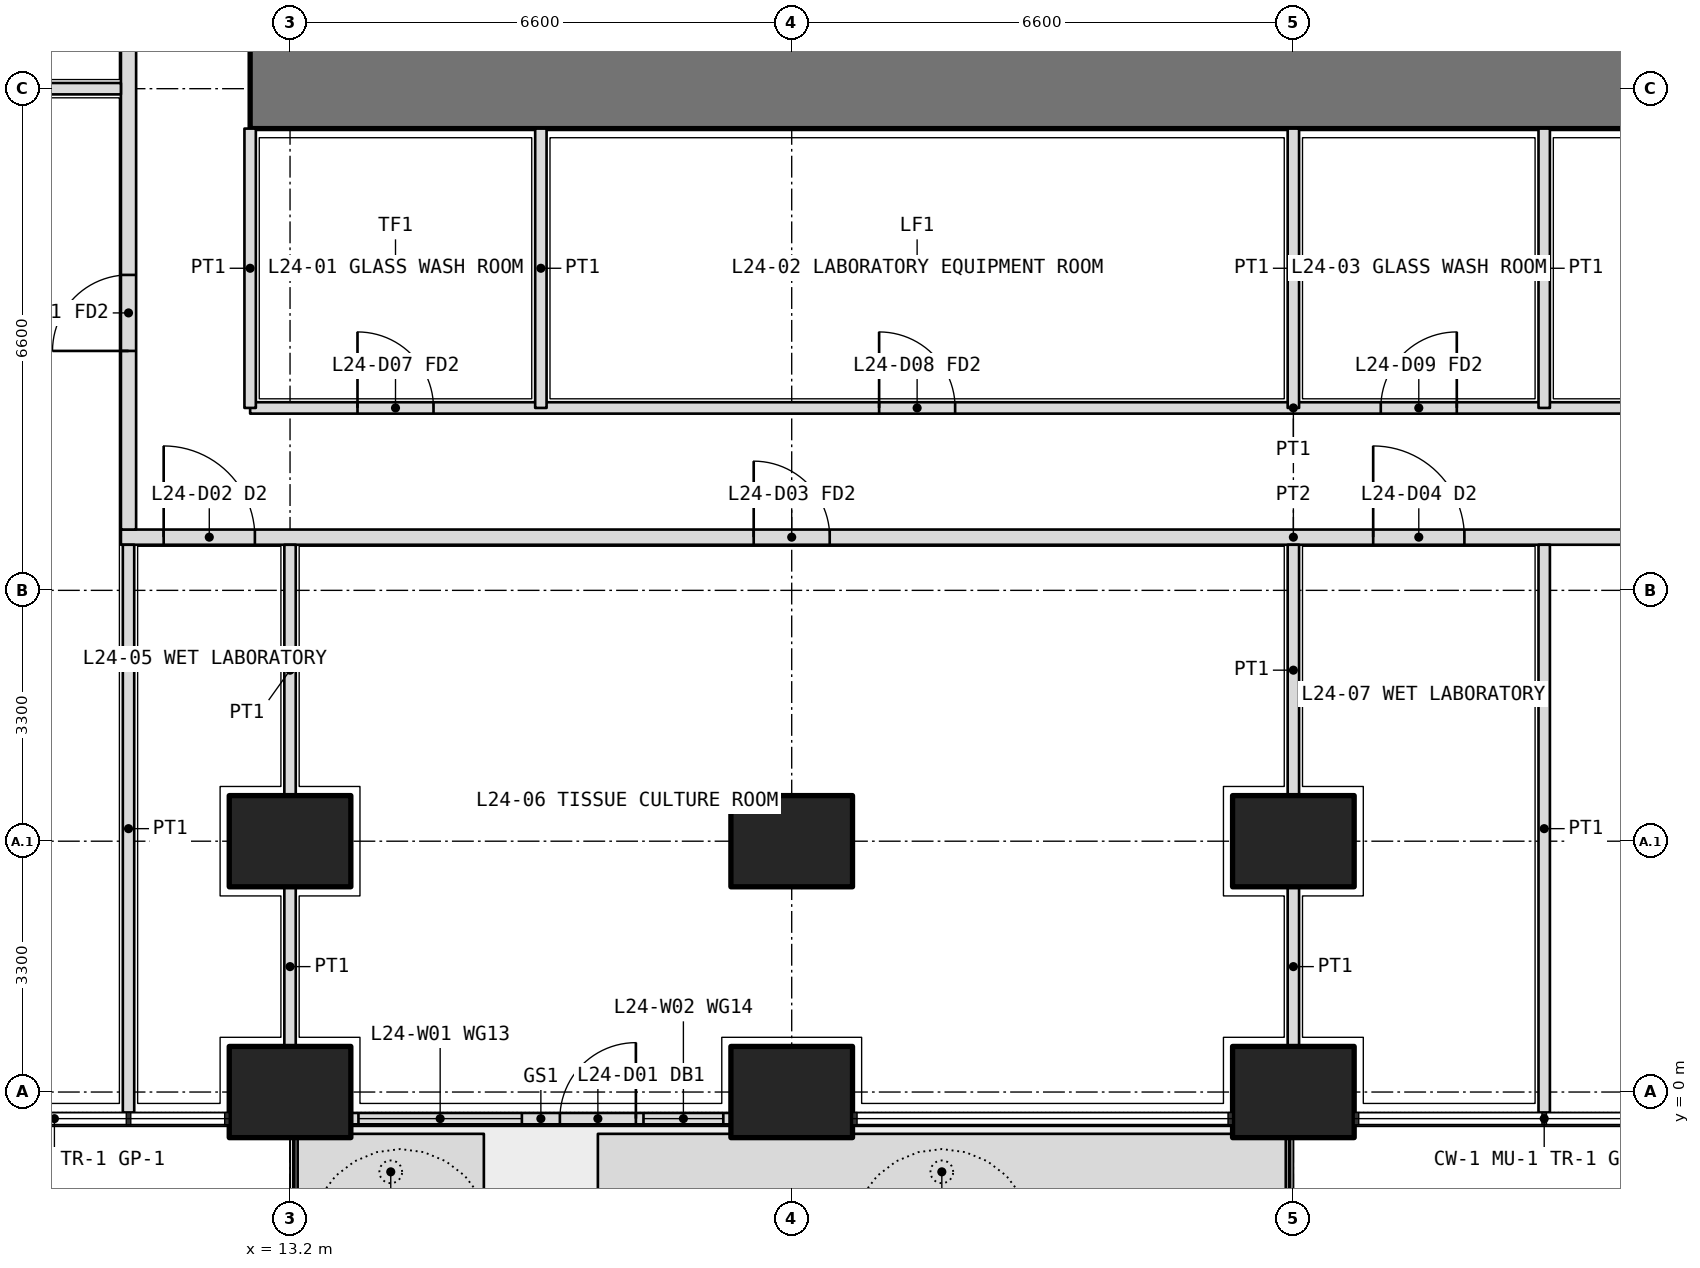
"""IFC4 building model, lengths in metres.
Left out: names, types, materials, properties, quantities, classifications, styles, units other than length and angle.
Written with IfcOpenShell. Run it as: python <this file> out.ifc"""

import sys

from ifc_helpers import new_model, si_unit, direction, frame, frame_2d, origin, origin_2d, place, context, subcontext, project, spatial, polyline, rectangle, outline, extrude, element, fill, save


model = new_model("IFC4")
c1 = context("Model", 3, precision=1e-05, world=origin(), true_north=direction((0.0, 1.0)))
c2 = subcontext(c1, "Body", "Model", "MODEL_VIEW")
j1 = project(units=[si_unit("LENGTHUNIT", "METRE"), si_unit("PLANEANGLEUNIT", "RADIAN")], contexts=[c1])
p1 = place(None, origin())
s1 = spatial("IfcSite", under=j1, at=p1, CompositionType="ELEMENT")
p2 = place(p1, origin())
s2 = spatial("IfcBuilding", under=s1, at=p2, CompositionType="ELEMENT")
p3 = place(p2, frame((0.0, 0.0, 107.4)))
s3 = spatial("IfcBuildingStorey", under=s2, at=p3, CompositionType="ELEMENT", Elevation=107.4)
for number, where, z_axis, x_axis in (
    (1, (13.2, 0.0, 0.0), (0.0, 0.0, 1.0), (1.0, 0.0, 0.0)),
    (2, (19.8, 0.0, 0.0), (0.0, 0.0, 1.0), (1.0, 0.0, 0.0)),
    (3, (26.4, 0.0, 0.0), (0.0, 0.0, 1.0), (1.0, 0.0, 0.0)),
    (4, (13.2, 3.3, 0.0), (0.0, 0.0, 1.0), (1.0, 0.0, 0.0)),
    (5, (19.8, 3.3, 0.0), (0.0, 0.0, 1.0), (1.0, 0.0, 0.0)),
    (6, (26.4, 3.3, 0.0), (0.0, 0.0, 1.0), (1.0, 0.0, 0.0)),
):
    element("IfcColumn", number, at=place(p3, frame(where, z_axis=z_axis, x_axis=x_axis)), inside=s3, PredefinedType="COLUMN", context=c2, shape_type="SweptSolid", body=[
        extrude(rectangle(XDim=1.6, YDim=1.2, at=origin_2d()), origin(), (0.0, 0.0, 1.0), 4.2),
    ])
p4 = place(p3, origin())
e7 = element("IfcWall", 7, at=p4, inside=s3, PredefinedType="USERDEFINED", context=c2, shape_type="SweptSolid", body=[
    extrude(outline(polyline([(13.3, -1.55), (15.75, -1.55), (15.75, -0.55), (13.3, -0.55), (13.3, -1.55)]), holes=[polyline([(13.45, -1.4), (15.6, -1.4), (15.6, -0.7), (13.45, -0.7), (13.45, -1.4)])]), origin(), (0.0, 0.0, 1.0), 1.05),
])
p5 = place(p3, origin())
e8 = element("IfcWall", 8, at=p5, inside=s3, PredefinedType="USERDEFINED", context=c2, shape_type="SweptSolid", body=[
    extrude(outline(polyline([(17.25, -1.55), (26.3, -1.55), (26.3, -0.55), (17.25, -0.55), (17.25, -1.55)]), holes=[polyline([(17.4, -1.4), (26.15, -1.4), (26.15, -0.7), (17.4, -0.7), (17.4, -1.4)])]), origin(), (0.0, 0.0, 1.0), 1.05),
])
p6 = place(p3, frame((14.0, -0.35, 0.0), z_axis=(0.0, 0.0, 1.0), x_axis=(1.0, 0.0, 0.0)))
e9 = element("IfcWall", 9, at=p6, inside=s3, PredefinedType="SOLIDWALL", context=c2, shape_type="SweptSolid", body=[
    extrude(rectangle(XDim=5.0, YDim=0.15, at=frame_2d((2.5, 0.0))), origin(), (0.0, 0.0, 1.0), 2.7),
])
p7 = place(p6, frame((2.75, 0.0, 0.0)))
e10 = element("IfcOpeningElement", 10, at=p7, cuts=e9, PredefinedType="OPENING", context=c2, shape_type="SweptSolid", body=[
    extrude(rectangle(XDim=1.0, YDim=2.4, at=frame_2d((0.5, 1.2))), frame((0.0, 0.085, 0.0), z_axis=(0.0, -1.0, 0.0), x_axis=(1.0, 0.0, 0.0)), (0.0, 0.0, 1.0), 0.17),
])
p8 = place(p6, frame((0.1, 0.0, 0.1)))
e11 = element("IfcOpeningElement", 11, at=p8, cuts=e9, PredefinedType="OPENING", context=c2, shape_type="SweptSolid", body=[
    extrude(rectangle(XDim=2.15, YDim=2.3, at=frame_2d((1.075, 1.15))), frame((0.0, 0.085, 0.0), z_axis=(0.0, -1.0, 0.0), x_axis=(1.0, 0.0, 0.0)), (0.0, 0.0, 1.0), 0.17),
])
p9 = place(p6, frame((3.85, 0.0, 0.1)))
e12 = element("IfcOpeningElement", 12, at=p9, cuts=e9, PredefinedType="OPENING", context=c2, shape_type="SweptSolid", body=[
    extrude(rectangle(XDim=1.05, YDim=2.3, at=frame_2d((0.525, 1.15))), frame((0.0, 0.085, 0.0), z_axis=(0.0, -1.0, 0.0), x_axis=(1.0, 0.0, 0.0)), (0.0, 0.0, 1.0), 0.17),
])
p10 = place(p3, frame((12.675, 13.2, 0.0), z_axis=(0.0, 0.0, 1.0), x_axis=(1.0, 0.0, 0.0)))
e13 = element("IfcWall", 13, at=p10, inside=s3, PredefinedType="SHEAR", context=c2, shape_type="SweptSolid", body=[
    extrude(rectangle(XDim=27.45, YDim=1.05, at=frame_2d((13.725, 0.0))), origin(), (0.0, 0.0, 1.0), 4.2),
])
p11 = place(p3, frame((12.675, 9.0, 0.0), z_axis=(0.0, 0.0, 1.0), x_axis=(1.0, 0.0, 0.0)))
e14 = element("IfcWall", 14, at=p11, inside=s3, PredefinedType="PARTITIONING", context=c2, shape_type="SweptSolid", body=[
    extrude(rectangle(XDim=27.45, YDim=0.15, at=frame_2d((13.725, 0.0))), origin(), (0.0, 0.0, 1.0), 2.85),
])
p12 = place(p11, frame((1.413, 0.0, 0.0)))
e15 = element("IfcOpeningElement", 15, at=p12, cuts=e14, PredefinedType="OPENING", context=c2, shape_type="SweptSolid", body=[
    extrude(rectangle(XDim=1.0, YDim=2.1, at=frame_2d((0.5, 1.05))), frame((0.0, 0.085, 0.0), z_axis=(0.0, -1.0, 0.0), x_axis=(1.0, 0.0, 0.0)), (0.0, 0.0, 1.0), 0.17),
])
p13 = place(p11, frame((8.275, 0.0, 0.0)))
e16 = element("IfcOpeningElement", 16, at=p13, cuts=e14, PredefinedType="OPENING", context=c2, shape_type="SweptSolid", body=[
    extrude(rectangle(XDim=1.0, YDim=2.1, at=frame_2d((0.5, 1.05))), frame((0.0, 0.085, 0.0), z_axis=(0.0, -1.0, 0.0), x_axis=(1.0, 0.0, 0.0)), (0.0, 0.0, 1.0), 0.17),
])
p14 = place(p11, frame((14.875, 0.0, 0.0)))
e17 = element("IfcOpeningElement", 17, at=p14, cuts=e14, PredefinedType="OPENING", context=c2, shape_type="SweptSolid", body=[
    extrude(rectangle(XDim=1.0, YDim=2.1, at=frame_2d((0.5, 1.05))), frame((0.0, 0.085, 0.0), z_axis=(0.0, -1.0, 0.0), x_axis=(1.0, 0.0, 0.0)), (0.0, 0.0, 1.0), 0.17),
])
p15 = place(p11, frame((21.738, 0.0, 0.0)))
e18 = element("IfcOpeningElement", 18, at=p15, cuts=e14, PredefinedType="OPENING", context=c2, shape_type="SweptSolid", body=[
    extrude(rectangle(XDim=1.0, YDim=2.1, at=frame_2d((0.5, 1.05))), frame((0.0, 0.085, 0.0), z_axis=(0.0, -1.0, 0.0), x_axis=(1.0, 0.0, 0.0)), (0.0, 0.0, 1.0), 0.17),
])
p16 = place(p3, frame((12.675, 12.675, 0.0), z_axis=(0.0, 0.0, 1.0), x_axis=(0.0, -1.0, 0.0)))
e19 = element("IfcWall", 19, at=p16, inside=s3, PredefinedType="PARTITIONING", context=c2, shape_type="SweptSolid", body=[
    extrude(rectangle(XDim=3.675, YDim=0.15, at=frame_2d((1.837, 0.0))), origin(), (0.0, 0.0, 1.0), 2.85),
])
p17 = place(p3, frame((16.5, 12.675, 0.0), z_axis=(0.0, 0.0, 1.0), x_axis=(0.0, -1.0, 0.0)))
e20 = element("IfcWall", 20, at=p17, inside=s3, PredefinedType="PARTITIONING", context=c2, shape_type="SweptSolid", body=[
    extrude(rectangle(XDim=3.675, YDim=0.15, at=frame_2d((1.837, 0.0))), origin(), (0.0, 0.0, 1.0), 3.9),
])
p18 = place(p3, frame((26.4, 12.675, 0.0), z_axis=(0.0, 0.0, 1.0), x_axis=(0.0, -1.0, 0.0)))
e21 = element("IfcWall", 21, at=p18, inside=s3, PredefinedType="PARTITIONING", context=c2, shape_type="SweptSolid", body=[
    extrude(rectangle(XDim=3.675, YDim=0.15, at=frame_2d((1.837, 0.0))), origin(), (0.0, 0.0, 1.0), 2.85),
])
p19 = place(p3, frame((29.7, 12.675, 0.0), z_axis=(0.0, 0.0, 1.0), x_axis=(0.0, -1.0, 0.0)))
e22 = element("IfcWall", 22, at=p19, inside=s3, PredefinedType="PARTITIONING", context=c2, shape_type="SweptSolid", body=[
    extrude(rectangle(XDim=3.675, YDim=0.15, at=frame_2d((1.837, 0.0))), origin(), (0.0, 0.0, 1.0), 3.9),
])
p20 = place(p3, frame((10.975, 7.3, 0.0), z_axis=(0.0, 0.0, 1.0), x_axis=(1.0, 0.0, 0.0)))
e23 = element("IfcWall", 23, at=p20, inside=s3, PredefinedType="PARTITIONING", context=c2, shape_type="SweptSolid", body=[
    extrude(rectangle(XDim=30.85, YDim=0.2, at=frame_2d((15.425, 0.0))), origin(), (0.0, 0.0, 1.0), 2.85),
])
p21 = place(p20, frame((0.562, 0.0, 0.0)))
e24 = element("IfcOpeningElement", 24, at=p21, cuts=e23, PredefinedType="OPENING", context=c2, shape_type="SweptSolid", body=[
    extrude(rectangle(XDim=1.2, YDim=2.1, at=frame_2d((0.6, 1.05))), frame((0.0, 0.11, 0.0), z_axis=(0.0, -1.0, 0.0), x_axis=(1.0, 0.0, 0.0)), (0.0, 0.0, 1.0), 0.22),
])
p22 = place(p20, frame((8.325, 0.0, 0.0)))
e25 = element("IfcOpeningElement", 25, at=p22, cuts=e23, PredefinedType="OPENING", context=c2, shape_type="SweptSolid", body=[
    extrude(rectangle(XDim=1.0, YDim=2.1, at=frame_2d((0.5, 1.05))), frame((0.0, 0.11, 0.0), z_axis=(0.0, -1.0, 0.0), x_axis=(1.0, 0.0, 0.0)), (0.0, 0.0, 1.0), 0.22),
])
p23 = place(p20, frame((16.475, 0.0, 0.0)))
e26 = element("IfcOpeningElement", 26, at=p23, cuts=e23, PredefinedType="OPENING", context=c2, shape_type="SweptSolid", body=[
    extrude(rectangle(XDim=1.2, YDim=2.1, at=frame_2d((0.6, 1.05))), frame((0.0, 0.11, 0.0), z_axis=(0.0, -1.0, 0.0), x_axis=(1.0, 0.0, 0.0)), (0.0, 0.0, 1.0), 0.22),
])
p24 = place(p20, frame((21.525, 0.0, 0.0)))
e27 = element("IfcOpeningElement", 27, at=p24, cuts=e23, PredefinedType="OPENING", context=c2, shape_type="SweptSolid", body=[
    extrude(rectangle(XDim=1.0, YDim=2.1, at=frame_2d((0.5, 1.05))), frame((0.0, 0.11, 0.0), z_axis=(0.0, -1.0, 0.0), x_axis=(1.0, 0.0, 0.0)), (0.0, 0.0, 1.0), 0.22),
])
p25 = place(p20, frame((27.538, 0.0, 0.0)))
e28 = element("IfcOpeningElement", 28, at=p25, cuts=e23, PredefinedType="OPENING", context=c2, shape_type="SweptSolid", body=[
    extrude(rectangle(XDim=1.0, YDim=2.1, at=frame_2d((0.5, 1.05))), frame((0.0, 0.11, 0.0), z_axis=(0.0, -1.0, 0.0), x_axis=(1.0, 0.0, 0.0)), (0.0, 0.0, 1.0), 0.22),
])
p26 = place(p3, frame((11.075, 7.4, 0.0), z_axis=(0.0, 0.0, 1.0), x_axis=(0.0, 1.0, 0.0)))
e29 = element("IfcWall", 29, at=p26, inside=s3, PredefinedType="PARTITIONING", context=c2, shape_type="SweptSolid", body=[
    extrude(rectangle(XDim=27.625, YDim=0.2, at=frame_2d((13.812, 0.0))), origin(), (0.0, 0.0, 1.0), 2.85),
])
p27 = place(p26, frame((2.35, 0.0, 0.0)))
e30 = element("IfcOpeningElement", 30, at=p27, cuts=e29, PredefinedType="OPENING", context=c2, shape_type="SweptSolid", body=[
    extrude(rectangle(XDim=1.0, YDim=2.1, at=frame_2d((0.5, 1.05))), frame((0.0, 0.11, 0.0), z_axis=(0.0, -1.0, 0.0), x_axis=(1.0, 0.0, 0.0)), (0.0, 0.0, 1.0), 0.22),
])
p28 = place(p26, frame((6.35, 0.0, 0.0)))
e31 = element("IfcOpeningElement", 31, at=p28, cuts=e29, PredefinedType="OPENING", context=c2, shape_type="SweptSolid", body=[
    extrude(rectangle(XDim=1.0, YDim=2.1, at=frame_2d((0.5, 1.05))), frame((0.0, 0.11, 0.0), z_axis=(0.0, -1.0, 0.0), x_axis=(1.0, 0.0, 0.0)), (0.0, 0.0, 1.0), 0.22),
])
p29 = place(p26, frame((9.4, 0.0, 0.0)))
e32 = element("IfcOpeningElement", 32, at=p29, cuts=e29, PredefinedType="OPENING", context=c2, shape_type="SweptSolid", body=[
    extrude(rectangle(XDim=0.9, YDim=2.1, at=frame_2d((0.45, 1.05))), frame((0.0, 0.11, 0.0), z_axis=(0.0, -1.0, 0.0), x_axis=(1.0, 0.0, 0.0)), (0.0, 0.0, 1.0), 0.22),
])
p30 = place(p26, frame((13.2, 0.0, 0.0)))
e33 = element("IfcOpeningElement", 33, at=p30, cuts=e29, PredefinedType="OPENING", context=c2, shape_type="SweptSolid", body=[
    extrude(rectangle(XDim=0.9, YDim=2.1, at=frame_2d((0.45, 1.05))), frame((0.0, 0.11, 0.0), z_axis=(0.0, -1.0, 0.0), x_axis=(1.0, 0.0, 0.0)), (0.0, 0.0, 1.0), 0.22),
])
p31 = place(p26, frame((16.75, 0.0, 0.0)))
e34 = element("IfcOpeningElement", 34, at=p31, cuts=e29, PredefinedType="OPENING", context=c2, shape_type="SweptSolid", body=[
    extrude(rectangle(XDim=1.0, YDim=2.1, at=frame_2d((0.5, 1.05))), frame((0.0, 0.11, 0.0), z_axis=(0.0, -1.0, 0.0), x_axis=(1.0, 0.0, 0.0)), (0.0, 0.0, 1.0), 0.22),
])
p32 = place(p26, frame((20.15, 0.0, 0.0)))
e35 = element("IfcOpeningElement", 35, at=p32, cuts=e29, PredefinedType="OPENING", context=c2, shape_type="SweptSolid", body=[
    extrude(rectangle(XDim=1.0, YDim=2.1, at=frame_2d((0.5, 1.05))), frame((0.0, 0.11, 0.0), z_axis=(0.0, -1.0, 0.0), x_axis=(1.0, 0.0, 0.0)), (0.0, 0.0, 1.0), 0.22),
])
p33 = place(p26, frame((24.512, 0.0, 0.0)))
e36 = element("IfcOpeningElement", 36, at=p33, cuts=e29, PredefinedType="OPENING", context=c2, shape_type="SweptSolid", body=[
    extrude(rectangle(XDim=1.0, YDim=2.1, at=frame_2d((0.5, 1.05))), frame((0.0, 0.11, 0.0), z_axis=(0.0, -1.0, 0.0), x_axis=(1.0, 0.0, 0.0)), (0.0, 0.0, 1.0), 0.22),
])
p34 = place(p3, frame((11.075, -0.27, 0.0), z_axis=(0.0, 0.0, 1.0), x_axis=(0.0, 1.0, 0.0)))
e37 = element("IfcWall", 37, at=p34, inside=s3, PredefinedType="PARTITIONING", context=c2, shape_type="SweptSolid", body=[
    extrude(rectangle(XDim=7.47, YDim=0.15, at=frame_2d((3.735, 0.0))), origin(), (0.0, 0.0, 1.0), 2.7),
])
p35 = place(p3, frame((13.2, 0.6, 0.0), z_axis=(0.0, 0.0, 1.0), x_axis=(0.0, 1.0, 0.0)))
e38 = element("IfcWall", 38, at=p35, inside=s3, PredefinedType="PARTITIONING", context=c2, shape_type="SweptSolid", body=[
    extrude(rectangle(XDim=2.1, YDim=0.15, at=frame_2d((1.05, 0.0))), origin(), (0.0, 0.0, 1.0), 2.85),
])
p36 = place(p3, frame((13.2, 3.9, 0.0), z_axis=(0.0, 0.0, 1.0), x_axis=(0.0, 1.0, 0.0)))
e39 = element("IfcWall", 39, at=p36, inside=s3, PredefinedType="PARTITIONING", context=c2, shape_type="SweptSolid", body=[
    extrude(rectangle(XDim=3.3, YDim=0.15, at=frame_2d((1.65, 0.0))), origin(), (0.0, 0.0, 1.0), 2.85),
])
p37 = place(p3, frame((26.4, 0.6, 0.0), z_axis=(0.0, 0.0, 1.0), x_axis=(0.0, 1.0, 0.0)))
e40 = element("IfcWall", 40, at=p37, inside=s3, PredefinedType="PARTITIONING", context=c2, shape_type="SweptSolid", body=[
    extrude(rectangle(XDim=2.1, YDim=0.15, at=frame_2d((1.05, 0.0))), origin(), (0.0, 0.0, 1.0), 2.85),
])
p38 = place(p3, frame((26.4, 3.9, 0.0), z_axis=(0.0, 0.0, 1.0), x_axis=(0.0, 1.0, 0.0)))
e41 = element("IfcWall", 41, at=p38, inside=s3, PredefinedType="PARTITIONING", context=c2, shape_type="SweptSolid", body=[
    extrude(rectangle(XDim=3.3, YDim=0.15, at=frame_2d((1.65, 0.0))), origin(), (0.0, 0.0, 1.0), 2.85),
])
p39 = place(p3, frame((29.7, -0.27, 0.0), z_axis=(0.0, 0.0, 1.0), x_axis=(0.0, 1.0, 0.0)))
e42 = element("IfcWall", 42, at=p39, inside=s3, PredefinedType="PARTITIONING", context=c2, shape_type="SweptSolid", body=[
    extrude(rectangle(XDim=7.47, YDim=0.15, at=frame_2d((3.735, 0.0))), origin(), (0.0, 0.0, 1.0), 2.7),
])
p40 = place(p3, frame((7.2, 13.2, 0.0), z_axis=(0.0, 0.0, 1.0), x_axis=(1.0, 0.0, 0.0)))
e43 = element("IfcWall", 43, at=p40, inside=s3, PredefinedType="PARTITIONING", context=c2, shape_type="SweptSolid", body=[
    extrude(rectangle(XDim=3.775, YDim=0.15, at=frame_2d((1.888, 0.0))), origin(), (0.0, 0.0, 1.0), 2.85),
])
p41 = place(p7, origin())
e44 = element("IfcDoor", 44, at=p41, inside=s3, OperationType="SINGLE_SWING_RIGHT", PredefinedType="DOOR", context=c2, shape_type="SweptSolid", body=[
    extrude(rectangle(XDim=1.0, YDim=2.4, at=frame_2d((0.5, 1.2))), frame((0.0, 0.025, 0.0), z_axis=(0.0, -1.0, 0.0), x_axis=(1.0, 0.0, 0.0)), (0.0, 0.0, 1.0), 0.05),
])
fill(e10, e44)
p42 = place(p8, origin())
e45 = element("IfcWindow", 45, at=p42, inside=s3, PartitioningType="SINGLE_PANEL", PredefinedType="WINDOW", context=c2, shape_type="SweptSolid", body=[
    extrude(rectangle(XDim=2.15, YDim=2.3, at=frame_2d((1.075, 1.15))), frame((0.0, 0.03, 0.0), z_axis=(0.0, -1.0, 0.0), x_axis=(1.0, 0.0, 0.0)), (0.0, 0.0, 1.0), 0.06),
])
fill(e11, e45)
p43 = place(p9, origin())
e46 = element("IfcWindow", 46, at=p43, inside=s3, PartitioningType="SINGLE_PANEL", PredefinedType="WINDOW", context=c2, shape_type="SweptSolid", body=[
    extrude(rectangle(XDim=1.05, YDim=2.3, at=frame_2d((0.525, 1.15))), frame((0.0, 0.03, 0.0), z_axis=(0.0, -1.0, 0.0), x_axis=(1.0, 0.0, 0.0)), (0.0, 0.0, 1.0), 0.06),
])
fill(e12, e46)
p44 = place(p12, origin())
e47 = element("IfcDoor", 47, at=p44, inside=s3, OperationType="SINGLE_SWING_LEFT", PredefinedType="DOOR", context=c2, shape_type="SweptSolid", body=[
    extrude(rectangle(XDim=1.0, YDim=2.1, at=frame_2d((0.5, 1.05))), frame((0.0, 0.025, 0.0), z_axis=(0.0, -1.0, 0.0), x_axis=(1.0, 0.0, 0.0)), (0.0, 0.0, 1.0), 0.05),
])
fill(e15, e47)
p45 = place(p13, origin())
e48 = element("IfcDoor", 48, at=p45, inside=s3, OperationType="SINGLE_SWING_LEFT", PredefinedType="DOOR", context=c2, shape_type="SweptSolid", body=[
    extrude(rectangle(XDim=1.0, YDim=2.1, at=frame_2d((0.5, 1.05))), frame((0.0, 0.025, 0.0), z_axis=(0.0, -1.0, 0.0), x_axis=(1.0, 0.0, 0.0)), (0.0, 0.0, 1.0), 0.05),
])
fill(e16, e48)
p46 = place(p14, origin())
e49 = element("IfcDoor", 49, at=p46, inside=s3, OperationType="SINGLE_SWING_RIGHT", PredefinedType="DOOR", context=c2, shape_type="SweptSolid", body=[
    extrude(rectangle(XDim=1.0, YDim=2.1, at=frame_2d((0.5, 1.05))), frame((0.0, 0.025, 0.0), z_axis=(0.0, -1.0, 0.0), x_axis=(1.0, 0.0, 0.0)), (0.0, 0.0, 1.0), 0.05),
])
fill(e17, e49)
p47 = place(p21, origin())
e50 = element("IfcDoor", 50, at=p47, inside=s3, OperationType="DOUBLE_DOOR_SINGLE_SWING", PredefinedType="DOOR", context=c2, shape_type="SweptSolid", body=[
    extrude(rectangle(XDim=1.2, YDim=2.1, at=frame_2d((0.6, 1.05))), frame((0.0, 0.025, 0.0), z_axis=(0.0, -1.0, 0.0), x_axis=(1.0, 0.0, 0.0)), (0.0, 0.0, 1.0), 0.05),
])
fill(e24, e50)
p48 = place(p22, origin())
e51 = element("IfcDoor", 51, at=p48, inside=s3, OperationType="SINGLE_SWING_LEFT", PredefinedType="DOOR", context=c2, shape_type="SweptSolid", body=[
    extrude(rectangle(XDim=1.0, YDim=2.1, at=frame_2d((0.5, 1.05))), frame((0.0, 0.025, 0.0), z_axis=(0.0, -1.0, 0.0), x_axis=(1.0, 0.0, 0.0)), (0.0, 0.0, 1.0), 0.05),
])
fill(e25, e51)
p49 = place(p23, origin())
e52 = element("IfcDoor", 52, at=p49, inside=s3, OperationType="DOUBLE_DOOR_SINGLE_SWING", PredefinedType="DOOR", context=c2, shape_type="SweptSolid", body=[
    extrude(rectangle(XDim=1.2, YDim=2.1, at=frame_2d((0.6, 1.05))), frame((0.0, 0.025, 0.0), z_axis=(0.0, -1.0, 0.0), x_axis=(1.0, 0.0, 0.0)), (0.0, 0.0, 1.0), 0.05),
])
fill(e26, e52)
p50 = place(p27, origin())
e53 = element("IfcDoor", 53, at=p50, inside=s3, OperationType="SINGLE_SWING_LEFT", PredefinedType="DOOR", context=c2, shape_type="SweptSolid", body=[
    extrude(rectangle(XDim=1.0, YDim=2.1, at=frame_2d((0.5, 1.05))), frame((0.0, 0.025, 0.0), z_axis=(0.0, -1.0, 0.0), x_axis=(1.0, 0.0, 0.0)), (0.0, 0.0, 1.0), 0.05),
])
fill(e30, e53)
save(model, sys.argv[1])
